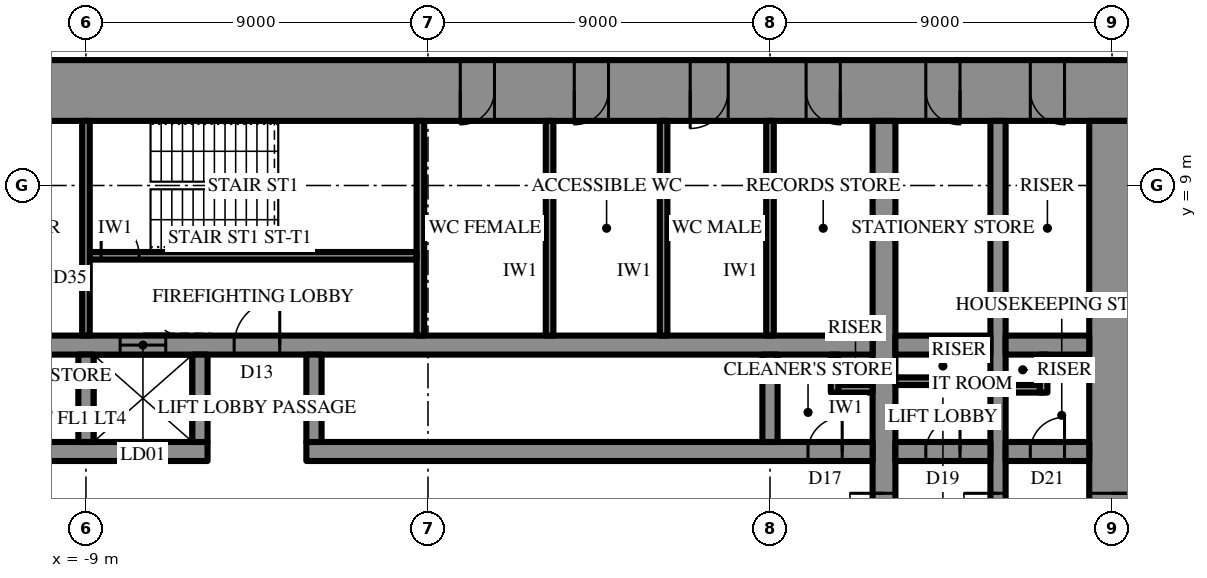
"""IFC4 building model, lengths in metres.
Left out: names, types, materials, properties, quantities, classifications, styles, units other than length and angle.
Written with IfcOpenShell. Run it as: python <this file> out.ifc"""

import sys

from ifc_helpers import new_model, si_unit, direction, frame, frame_2d, origin, place, context, subcontext, project, spatial, rectangle, extrude, element, fill, save


model = new_model("IFC4")
c1 = context("Model", 3, precision=1e-05, world=origin(), true_north=direction((0.0, 1.0)))
c2 = subcontext(c1, "Body", "Model", "MODEL_VIEW")
j1 = project(units=[si_unit("LENGTHUNIT", "METRE"), si_unit("PLANEANGLEUNIT", "RADIAN")], contexts=[c1])
p1 = place(None, origin())
s1 = spatial("IfcSite", under=j1, at=p1, CompositionType="ELEMENT")
p2 = place(p1, origin())
s2 = spatial("IfcBuilding", under=s1, at=p2, CompositionType="ELEMENT")
p3 = place(p2, frame((0.0, 0.0, -9.0)))
s3 = spatial("IfcBuildingStorey", under=s2, at=p3, CompositionType="ELEMENT", Elevation=-9.0)
p4 = place(p3, frame((-18.6, 11.5, 0.0), z_axis=(0.0, 0.0, 1.0), x_axis=(1.0, 0.0, 0.0)))
e1 = element("IfcWall", 1, at=p4, inside=s3, PredefinedType="SHEAR", context=c2, shape_type="SweptSolid", body=[
    extrude(rectangle(XDim=37.2, YDim=1.6, at=frame_2d((18.6, 0.0))), origin(), (0.0, 0.0, 1.0), 4.5),
])
p5 = place(p4, frame((19.45, 0.0, 0.0)))
e2 = element("IfcOpeningElement", 2, at=p5, cuts=e1, PredefinedType="OPENING", context=c2, shape_type="SweptSolid", body=[
    extrude(rectangle(XDim=0.9, YDim=2.2, at=frame_2d((0.45, 1.1))), frame((0.0, 0.81, 0.0), z_axis=(0.0, -1.0, 0.0), x_axis=(1.0, 0.0, 0.0)), (0.0, 0.0, 1.0), 1.62),
])
p6 = place(p4, frame((22.45, 0.0, 0.0)))
e3 = element("IfcOpeningElement", 3, at=p6, cuts=e1, PredefinedType="OPENING", context=c2, shape_type="SweptSolid", body=[
    extrude(rectangle(XDim=0.9, YDim=2.2, at=frame_2d((0.45, 1.1))), frame((0.0, 0.81, 0.0), z_axis=(0.0, -1.0, 0.0), x_axis=(1.0, 0.0, 0.0)), (0.0, 0.0, 1.0), 1.62),
])
p7 = place(p4, frame((25.5, 0.0, 0.0)))
e4 = element("IfcOpeningElement", 4, at=p7, cuts=e1, PredefinedType="OPENING", context=c2, shape_type="SweptSolid", body=[
    extrude(rectangle(XDim=1.0, YDim=2.2, at=frame_2d((0.5, 1.1))), frame((0.0, 0.81, 0.0), z_axis=(0.0, -1.0, 0.0), x_axis=(1.0, 0.0, 0.0)), (0.0, 0.0, 1.0), 1.62),
])
p8 = place(p4, frame((1.85, 0.0, 0.0)))
e5 = element("IfcOpeningElement", 5, at=p8, cuts=e1, PredefinedType="OPENING", context=c2, shape_type="SweptSolid", body=[
    extrude(rectangle(XDim=0.9, YDim=2.2, at=frame_2d((0.45, 1.1))), frame((0.0, 0.81, 0.0), z_axis=(0.0, -1.0, 0.0), x_axis=(1.0, 0.0, 0.0)), (0.0, 0.0, 1.0), 1.62),
])
p9 = place(p4, frame((4.6, 0.0, 0.0)))
e6 = element("IfcOpeningElement", 6, at=p9, cuts=e1, PredefinedType="OPENING", context=c2, shape_type="SweptSolid", body=[
    extrude(rectangle(XDim=0.9, YDim=2.2, at=frame_2d((0.45, 1.1))), frame((0.0, 0.81, 0.0), z_axis=(0.0, -1.0, 0.0), x_axis=(1.0, 0.0, 0.0)), (0.0, 0.0, 1.0), 1.62),
])
p10 = place(p4, frame((7.75, 0.0, 0.0)))
e7 = element("IfcOpeningElement", 7, at=p10, cuts=e1, PredefinedType="OPENING", context=c2, shape_type="SweptSolid", body=[
    extrude(rectangle(XDim=0.9, YDim=2.2, at=frame_2d((0.45, 1.1))), frame((0.0, 0.81, 0.0), z_axis=(0.0, -1.0, 0.0), x_axis=(1.0, 0.0, 0.0)), (0.0, 0.0, 1.0), 1.62),
])
p11 = place(p4, frame((28.55, 0.0, 0.0)))
e8 = element("IfcOpeningElement", 8, at=p11, cuts=e1, PredefinedType="OPENING", context=c2, shape_type="SweptSolid", body=[
    extrude(rectangle(XDim=0.9, YDim=2.2, at=frame_2d((0.45, 1.1))), frame((0.0, 0.81, 0.0), z_axis=(0.0, -1.0, 0.0), x_axis=(1.0, 0.0, 0.0)), (0.0, 0.0, 1.0), 1.62),
])
p12 = place(p4, frame((31.7, 0.0, 0.0)))
e9 = element("IfcOpeningElement", 9, at=p12, cuts=e1, PredefinedType="OPENING", context=c2, shape_type="SweptSolid", body=[
    extrude(rectangle(XDim=0.9, YDim=2.2, at=frame_2d((0.45, 1.1))), frame((0.0, 0.81, 0.0), z_axis=(0.0, -1.0, 0.0), x_axis=(1.0, 0.0, 0.0)), (0.0, 0.0, 1.0), 1.62),
])
p13 = place(p4, frame((34.45, 0.0, 0.0)))
e10 = element("IfcOpeningElement", 10, at=p13, cuts=e1, PredefinedType="OPENING", context=c2, shape_type="SweptSolid", body=[
    extrude(rectangle(XDim=0.9, YDim=2.2, at=frame_2d((0.45, 1.1))), frame((0.0, 0.81, 0.0), z_axis=(0.0, -1.0, 0.0), x_axis=(1.0, 0.0, 0.0)), (0.0, 0.0, 1.0), 1.62),
])
p14 = place(p3, frame((18.0, -10.7, 0.0), z_axis=(0.0, 0.0, 1.0), x_axis=(0.0, 1.0, 0.0)))
e11 = element("IfcWall", 11, at=p14, inside=s3, PredefinedType="SHEAR", context=c2, shape_type="SweptSolid", body=[
    extrude(rectangle(XDim=21.4, YDim=1.2, at=frame_2d((10.7, 0.0))), origin(), (0.0, 0.0, 1.0), 4.5),
])
p15 = place(p14, frame((9.8, 0.0, 0.0)))
e12 = element("IfcOpeningElement", 12, at=p15, cuts=e11, PredefinedType="OPENING", context=c2, shape_type="SweptSolid", body=[
    extrude(rectangle(XDim=1.8, YDim=2.4, at=frame_2d((0.9, 1.2))), frame((0.0, 0.61, 0.0), z_axis=(0.0, -1.0, 0.0), x_axis=(1.0, 0.0, 0.0)), (0.0, 0.0, 1.0), 1.22),
])
p16 = place(p3, frame((12.0, -10.7, 0.0), z_axis=(0.0, 0.0, 1.0), x_axis=(0.0, 1.0, 0.0)))
e13 = element("IfcWall", 13, at=p16, inside=s3, PredefinedType="SHEAR", context=c2, shape_type="SweptSolid", body=[
    extrude(rectangle(XDim=21.4, YDim=0.6, at=frame_2d((10.7, 0.0))), origin(), (0.0, 0.0, 1.0), 4.5),
])
p17 = place(p16, frame((9.8, 0.0, 0.0)))
e14 = element("IfcOpeningElement", 14, at=p17, cuts=e13, PredefinedType="OPENING", context=c2, shape_type="SweptSolid", body=[
    extrude(rectangle(XDim=1.8, YDim=2.4, at=frame_2d((0.9, 1.2))), frame((0.0, 0.31, 0.0), z_axis=(0.0, -1.0, 0.0), x_axis=(1.0, 0.0, 0.0)), (0.0, 0.0, 1.0), 0.62),
])
p18 = place(p3, frame((15.0, -10.7, 0.0), z_axis=(0.0, 0.0, 1.0), x_axis=(0.0, 1.0, 0.0)))
e15 = element("IfcWall", 15, at=p18, inside=s3, PredefinedType="SHEAR", context=c2, shape_type="SweptSolid", body=[
    extrude(rectangle(XDim=21.4, YDim=0.4, at=frame_2d((10.7, 0.0))), origin(), (0.0, 0.0, 1.0), 4.5),
])
p19 = place(p18, frame((9.8, 0.0, 0.0)))
e16 = element("IfcOpeningElement", 16, at=p19, cuts=e15, PredefinedType="OPENING", context=c2, shape_type="SweptSolid", body=[
    extrude(rectangle(XDim=1.8, YDim=2.4, at=frame_2d((0.9, 1.2))), frame((0.0, 0.21, 0.0), z_axis=(0.0, -1.0, 0.0), x_axis=(1.0, 0.0, 0.0)), (0.0, 0.0, 1.0), 0.42),
])
p20 = place(p3, frame((-11.7, 2.0, 0.0), z_axis=(0.0, 0.0, 1.0), x_axis=(1.0, 0.0, 0.0)))
e17 = element("IfcWall", 17, at=p20, inside=s3, PredefinedType="SHEAR", context=c2, shape_type="SweptSolid", body=[
    extrude(rectangle(XDim=5.9, YDim=0.5, at=frame_2d((2.95, 0.0))), origin(), (0.0, 0.0, 1.0), 4.5),
])
p21 = place(p20, frame((0.8, 0.0, 0.0)))
e18 = element("IfcOpeningElement", 18, at=p21, cuts=e17, PredefinedType="OPENING", context=c2, shape_type="SweptSolid", body=[
    extrude(rectangle(XDim=0.9, YDim=2.2, at=frame_2d((0.45, 1.1))), frame((0.0, 0.26, 0.0), z_axis=(0.0, -1.0, 0.0), x_axis=(1.0, 0.0, 0.0)), (0.0, 0.0, 1.0), 0.52),
])
p22 = place(p3, frame((-3.2, 2.0, 0.0), z_axis=(0.0, 0.0, 1.0), x_axis=(1.0, 0.0, 0.0)))
e19 = element("IfcWall", 19, at=p22, inside=s3, PredefinedType="SHEAR", context=c2, shape_type="SweptSolid", body=[
    extrude(rectangle(XDim=14.9, YDim=0.5, at=frame_2d((7.45, 0.0))), origin(), (0.0, 0.0, 1.0), 4.5),
])
p23 = place(p22, frame((13.2, 0.0, 0.0)))
e20 = element("IfcOpeningElement", 20, at=p23, cuts=e19, PredefinedType="OPENING", context=c2, shape_type="SweptSolid", body=[
    extrude(rectangle(XDim=0.9, YDim=2.2, at=frame_2d((0.45, 1.1))), frame((0.0, 0.26, 0.0), z_axis=(0.0, -1.0, 0.0), x_axis=(1.0, 0.0, 0.0)), (0.0, 0.0, 1.0), 0.52),
])
p24 = place(p3, frame((12.3, 2.0, 0.0), z_axis=(0.0, 0.0, 1.0), x_axis=(1.0, 0.0, 0.0)))
e21 = element("IfcWall", 21, at=p24, inside=s3, PredefinedType="SHEAR", context=c2, shape_type="SweptSolid", body=[
    extrude(rectangle(XDim=2.5, YDim=0.5, at=frame_2d((1.25, 0.0))), origin(), (0.0, 0.0, 1.0), 4.5),
])
p25 = place(p24, frame((0.8, 0.0, 0.0)))
e22 = element("IfcOpeningElement", 22, at=p25, cuts=e21, PredefinedType="OPENING", context=c2, shape_type="SweptSolid", body=[
    extrude(rectangle(XDim=0.9, YDim=2.2, at=frame_2d((0.45, 1.1))), frame((0.0, 0.26, 0.0), z_axis=(0.0, -1.0, 0.0), x_axis=(1.0, 0.0, 0.0)), (0.0, 0.0, 1.0), 0.52),
])
p26 = place(p3, frame((15.2, 2.0, 0.0), z_axis=(0.0, 0.0, 1.0), x_axis=(1.0, 0.0, 0.0)))
e23 = element("IfcWall", 23, at=p26, inside=s3, PredefinedType="SHEAR", context=c2, shape_type="SweptSolid", body=[
    extrude(rectangle(XDim=2.2, YDim=0.5, at=frame_2d((1.1, 0.0))), origin(), (0.0, 0.0, 1.0), 4.5),
])
p27 = place(p26, frame((0.65, 0.0, 0.0)))
e24 = element("IfcOpeningElement", 24, at=p27, cuts=e23, PredefinedType="OPENING", context=c2, shape_type="SweptSolid", body=[
    extrude(rectangle(XDim=0.9, YDim=2.2, at=frame_2d((0.45, 1.1))), frame((0.0, 0.26, 0.0), z_axis=(0.0, -1.0, 0.0), x_axis=(1.0, 0.0, 0.0)), (0.0, 0.0, 1.0), 0.52),
])
p28 = place(p3, frame((-11.7, 4.8, 0.0), z_axis=(0.0, 0.0, 1.0), x_axis=(1.0, 0.0, 0.0)))
e25 = element("IfcWall", 25, at=p28, inside=s3, PredefinedType="SHEAR", context=c2, shape_type="SweptSolid", body=[
    extrude(rectangle(XDim=23.4, YDim=0.5, at=frame_2d((11.7, 0.0))), origin(), (0.0, 0.0, 1.0), 4.5),
])
p29 = place(p28, frame((6.6, 0.0, 0.0)))
e26 = element("IfcOpeningElement", 26, at=p29, cuts=e25, PredefinedType="OPENING", context=c2, shape_type="SweptSolid", body=[
    extrude(rectangle(XDim=1.2, YDim=2.2, at=frame_2d((0.6, 1.1))), frame((0.0, 0.26, 0.0), z_axis=(0.0, -1.0, 0.0), x_axis=(1.0, 0.0, 0.0)), (0.0, 0.0, 1.0), 0.52),
])
p30 = place(p28, frame((3.6, 0.0, 0.0)))
e27 = element("IfcOpeningElement", 27, at=p30, cuts=e25, PredefinedType="OPENING", context=c2, shape_type="SweptSolid", body=[
    extrude(rectangle(XDim=1.2, YDim=2.2, at=frame_2d((0.6, 1.1))), frame((0.0, 0.26, 0.0), z_axis=(0.0, -1.0, 0.0), x_axis=(1.0, 0.0, 0.0)), (0.0, 0.0, 1.0), 0.52),
])
p31 = place(p3, frame((12.3, 4.8, 0.0), z_axis=(0.0, 0.0, 1.0), x_axis=(1.0, 0.0, 0.0)))
e28 = element("IfcWall", 28, at=p31, inside=s3, PredefinedType="SHEAR", context=c2, shape_type="SweptSolid", body=[
    extrude(rectangle(XDim=2.5, YDim=0.5, at=frame_2d((1.25, 0.0))), origin(), (0.0, 0.0, 1.0), 4.5),
])
p32 = place(p3, frame((15.2, 4.8, 0.0), z_axis=(0.0, 0.0, 1.0), x_axis=(1.0, 0.0, 0.0)))
e29 = element("IfcWall", 29, at=p32, inside=s3, PredefinedType="SHEAR", context=c2, shape_type="SweptSolid", body=[
    extrude(rectangle(XDim=2.2, YDim=0.5, at=frame_2d((1.1, 0.0))), origin(), (0.0, 0.0, 1.0), 4.5),
])
for number, where, z_axis, x_axis in (
    (30, (-9.0, 2.25, 0.0), (0.0, 0.0, 1.0), (0.0, 1.0, 0.0)),
    (31, (-6.0, 2.25, 0.0), (0.0, 0.0, 1.0), (0.0, 1.0, 0.0)),
    (32, (-3.0, 2.25, 0.0), (0.0, 0.0, 1.0), (0.0, 1.0, 0.0)),
    (33, (9.0, 2.25, 0.0), (0.0, 0.0, 1.0), (0.0, 1.0, 0.0)),
):
    element("IfcWall", number, at=place(p3, frame(where, z_axis=z_axis, x_axis=x_axis)), inside=s3, PredefinedType="SHEAR", context=c2, shape_type="SweptSolid", body=[
        extrude(rectangle(XDim=2.3, YDim=0.4, at=frame_2d((1.15, 0.0))), origin(), (0.0, 0.0, 1.0), 4.5),
    ])
p33 = place(p3, frame((-0.2, 5.05, 0.0), z_axis=(0.0, 0.0, 1.0), x_axis=(0.0, 1.0, 0.0)))
e34 = element("IfcWall", 34, at=p33, inside=s3, PredefinedType="SHEAR", context=c2, shape_type="SweptSolid", body=[
    extrude(rectangle(XDim=5.65, YDim=0.2, at=frame_2d((2.825, 0.0))), origin(), (0.0, 0.0, 1.0), 4.5),
])
p34 = place(p3, frame((-8.9, 7.15, 0.0), z_axis=(0.0, 0.0, 1.0), x_axis=(1.0, 0.0, 0.0)))
e35 = element("IfcWall", 35, at=p34, inside=s3, PredefinedType="SHEAR", context=c2, shape_type="SweptSolid", body=[
    extrude(rectangle(XDim=8.6, YDim=0.2, at=frame_2d((4.3, 0.0))), origin(), (0.0, 0.0, 1.0), 4.5),
])
p35 = place(p34, frame((0.3, 0.0, 0.0)))
e36 = element("IfcOpeningElement", 36, at=p35, cuts=e35, PredefinedType="OPENING", context=c2, shape_type="SweptSolid", body=[
    extrude(rectangle(XDim=1.0, YDim=2.2, at=frame_2d((0.5, 1.1))), frame((0.0, 0.11, 0.0), z_axis=(0.0, -1.0, 0.0), x_axis=(1.0, 0.0, 0.0)), (0.0, 0.0, 1.0), 0.22),
])
for number, where, z_axis, x_axis in (
    (37, (-9.0, 5.05, 0.0), (0.0, 0.0, 1.0), (0.0, 1.0, 0.0)),
    (38, (9.0, 5.05, 0.0), (0.0, 0.0, 1.0), (0.0, 1.0, 0.0)),
    (39, (3.2, 5.05, 0.0), (0.0, 0.0, 1.0), (0.0, 1.0, 0.0)),
    (40, (6.2, 5.05, 0.0), (0.0, 0.0, 1.0), (0.0, 1.0, 0.0)),
):
    element("IfcWall", number, at=place(p3, frame(where, z_axis=z_axis, x_axis=x_axis)), inside=s3, PredefinedType="PARTITIONING", context=c2, shape_type="SweptSolid", body=[
        extrude(rectangle(XDim=5.65, YDim=0.2, at=frame_2d((2.825, 0.0))), origin(), (0.0, 0.0, 1.0), 4.15),
    ])
for number, where, z_axis, x_axis in (
    (41, (10.7, 3.65, 0.0), (0.0, 0.0, 1.0), (1.0, 0.0, 0.0)),
    (42, (10.7, 3.55, 0.0), (0.0, 0.0, 1.0), (0.0, 1.0, 0.0)),
):
    element("IfcWall", number, at=place(p3, frame(where, z_axis=z_axis, x_axis=x_axis)), inside=s3, PredefinedType="PARTITIONING", context=c2, shape_type="SweptSolid", body=[
        extrude(rectangle(XDim=1.0, YDim=0.2, at=frame_2d((0.5, 0.0))), origin(), (0.0, 0.0, 1.0), 4.15),
    ])
p36 = place(p3, frame((12.3, 3.85, 0.0), z_axis=(0.0, 0.0, 1.0), x_axis=(1.0, 0.0, 0.0)))
e43 = element("IfcWall", 43, at=p36, inside=s3, PredefinedType="PARTITIONING", context=c2, shape_type="SweptSolid", body=[
    extrude(rectangle(XDim=2.5, YDim=0.2, at=frame_2d((1.25, 0.0))), origin(), (0.0, 0.0, 1.0), 4.15),
])
for number, where, z_axis, x_axis in (
    (44, (15.2, 3.65, 0.0), (0.0, 0.0, 1.0), (1.0, 0.0, 0.0)),
    (45, (16.2, 3.55, 0.0), (0.0, 0.0, 1.0), (0.0, 1.0, 0.0)),
):
    element("IfcWall", number, at=place(p3, frame(where, z_axis=z_axis, x_axis=x_axis)), inside=s3, PredefinedType="PARTITIONING", context=c2, shape_type="SweptSolid", body=[
        extrude(rectangle(XDim=1.0, YDim=0.2, at=frame_2d((0.5, 0.0))), origin(), (0.0, 0.0, 1.0), 4.15),
    ])
p37 = place(p15, frame((1.8, 0.0, 0.0), z_axis=(0.0, 0.0, 1.0), x_axis=(-1.0, 0.0, 0.0)))
e46 = element("IfcDoor", 46, at=p37, inside=s3, OperationType="DOUBLE_DOOR_SINGLE_SWING", PredefinedType="DOOR", context=c2, shape_type="SweptSolid", body=[
    extrude(rectangle(XDim=1.8, YDim=2.4, at=frame_2d((0.9, 1.2))), frame((0.0, 0.025, 0.0), z_axis=(0.0, -1.0, 0.0), x_axis=(1.0, 0.0, 0.0)), (0.0, 0.0, 1.0), 0.05),
])
fill(e12, e46)
p38 = place(p29, origin())
e47 = element("IfcDoor", 47, at=p38, inside=s3, OperationType="SINGLE_SWING_LEFT", PredefinedType="DOOR", context=c2, shape_type="SweptSolid", body=[
    extrude(rectangle(XDim=1.2, YDim=2.2, at=frame_2d((0.6, 1.1))), frame((0.0, 0.025, 0.0), z_axis=(0.0, -1.0, 0.0), x_axis=(1.0, 0.0, 0.0)), (0.0, 0.0, 1.0), 0.05),
])
fill(e26, e47)
p39 = place(p35, origin())
e48 = element("IfcDoor", 48, at=p39, inside=s3, OperationType="SINGLE_SWING_RIGHT", PredefinedType="DOOR", context=c2, shape_type="SweptSolid", body=[
    extrude(rectangle(XDim=1.0, YDim=2.2, at=frame_2d((0.5, 1.1))), frame((0.0, 0.025, 0.0), z_axis=(0.0, -1.0, 0.0), x_axis=(1.0, 0.0, 0.0)), (0.0, 0.0, 1.0), 0.05),
])
fill(e36, e48)
p40 = place(p5, frame((0.9, 0.0, 0.0), z_axis=(0.0, 0.0, 1.0), x_axis=(-1.0, 0.0, 0.0)))
e49 = element("IfcDoor", 49, at=p40, inside=s3, OperationType="SINGLE_SWING_LEFT", PredefinedType="DOOR", context=c2, shape_type="SweptSolid", body=[
    extrude(rectangle(XDim=0.9, YDim=2.2, at=frame_2d((0.45, 1.1))), frame((0.0, 0.025, 0.0), z_axis=(0.0, -1.0, 0.0), x_axis=(1.0, 0.0, 0.0)), (0.0, 0.0, 1.0), 0.05),
])
fill(e2, e49)
p41 = place(p6, frame((0.9, 0.0, 0.0), z_axis=(0.0, 0.0, 1.0), x_axis=(-1.0, 0.0, 0.0)))
e50 = element("IfcDoor", 50, at=p41, inside=s3, OperationType="SINGLE_SWING_LEFT", PredefinedType="DOOR", context=c2, shape_type="SweptSolid", body=[
    extrude(rectangle(XDim=0.9, YDim=2.2, at=frame_2d((0.45, 1.1))), frame((0.0, 0.025, 0.0), z_axis=(0.0, -1.0, 0.0), x_axis=(1.0, 0.0, 0.0)), (0.0, 0.0, 1.0), 0.05),
])
fill(e3, e50)
p42 = place(p7, frame((1.0, 0.0, 0.0), z_axis=(0.0, 0.0, 1.0), x_axis=(-1.0, 0.0, 0.0)))
e51 = element("IfcDoor", 51, at=p42, inside=s3, OperationType="SINGLE_SWING_LEFT", PredefinedType="DOOR", context=c2, shape_type="SweptSolid", body=[
    extrude(rectangle(XDim=1.0, YDim=2.2, at=frame_2d((0.5, 1.1))), frame((0.0, 0.025, 0.0), z_axis=(0.0, -1.0, 0.0), x_axis=(1.0, 0.0, 0.0)), (0.0, 0.0, 1.0), 0.05),
])
fill(e4, e51)
p43 = place(p11, frame((0.9, 0.0, 0.0), z_axis=(0.0, 0.0, 1.0), x_axis=(-1.0, 0.0, 0.0)))
e52 = element("IfcDoor", 52, at=p43, inside=s3, OperationType="SINGLE_SWING_RIGHT", PredefinedType="DOOR", context=c2, shape_type="SweptSolid", body=[
    extrude(rectangle(XDim=0.9, YDim=2.2, at=frame_2d((0.45, 1.1))), frame((0.0, 0.025, 0.0), z_axis=(0.0, -1.0, 0.0), x_axis=(1.0, 0.0, 0.0)), (0.0, 0.0, 1.0), 0.05),
])
fill(e8, e52)
p44 = place(p12, frame((0.9, 0.0, 0.0), z_axis=(0.0, 0.0, 1.0), x_axis=(-1.0, 0.0, 0.0)))
e53 = element("IfcDoor", 53, at=p44, inside=s3, OperationType="SINGLE_SWING_RIGHT", PredefinedType="DOOR", context=c2, shape_type="SweptSolid", body=[
    extrude(rectangle(XDim=0.9, YDim=2.2, at=frame_2d((0.45, 1.1))), frame((0.0, 0.025, 0.0), z_axis=(0.0, -1.0, 0.0), x_axis=(1.0, 0.0, 0.0)), (0.0, 0.0, 1.0), 0.05),
])
fill(e9, e53)
p45 = place(p13, frame((0.9, 0.0, 0.0), z_axis=(0.0, 0.0, 1.0), x_axis=(-1.0, 0.0, 0.0)))
e54 = element("IfcDoor", 54, at=p45, inside=s3, OperationType="SINGLE_SWING_RIGHT", PredefinedType="DOOR", context=c2, shape_type="SweptSolid", body=[
    extrude(rectangle(XDim=0.9, YDim=2.2, at=frame_2d((0.45, 1.1))), frame((0.0, 0.025, 0.0), z_axis=(0.0, -1.0, 0.0), x_axis=(1.0, 0.0, 0.0)), (0.0, 0.0, 1.0), 0.05),
])
fill(e10, e54)
p46 = place(p23, origin())
e55 = element("IfcDoor", 55, at=p46, inside=s3, OperationType="SINGLE_SWING_LEFT", PredefinedType="DOOR", context=c2, shape_type="SweptSolid", body=[
    extrude(rectangle(XDim=0.9, YDim=2.2, at=frame_2d((0.45, 1.1))), frame((0.0, 0.025, 0.0), z_axis=(0.0, -1.0, 0.0), x_axis=(1.0, 0.0, 0.0)), (0.0, 0.0, 1.0), 0.05),
])
fill(e20, e55)
p47 = place(p25, origin())
e56 = element("IfcDoor", 56, at=p47, inside=s3, OperationType="SINGLE_SWING_LEFT", PredefinedType="DOOR", context=c2, shape_type="SweptSolid", body=[
    extrude(rectangle(XDim=0.9, YDim=2.2, at=frame_2d((0.45, 1.1))), frame((0.0, 0.025, 0.0), z_axis=(0.0, -1.0, 0.0), x_axis=(1.0, 0.0, 0.0)), (0.0, 0.0, 1.0), 0.05),
])
fill(e22, e56)
p48 = place(p27, origin())
e57 = element("IfcDoor", 57, at=p48, inside=s3, OperationType="SINGLE_SWING_LEFT", PredefinedType="DOOR", context=c2, shape_type="SweptSolid", body=[
    extrude(rectangle(XDim=0.9, YDim=2.2, at=frame_2d((0.45, 1.1))), frame((0.0, 0.025, 0.0), z_axis=(0.0, -1.0, 0.0), x_axis=(1.0, 0.0, 0.0)), (0.0, 0.0, 1.0), 0.05),
])
fill(e24, e57)
p49 = place(p17, origin())
e58 = element("IfcDoor", 58, at=p49, inside=s3, OperationType="DOUBLE_DOOR_SINGLE_SWING", PredefinedType="DOOR", context=c2, shape_type="SweptSolid", body=[
    extrude(rectangle(XDim=1.8, YDim=2.4, at=frame_2d((0.9, 1.2))), frame((0.0, 0.025, 0.0), z_axis=(0.0, -1.0, 0.0), x_axis=(1.0, 0.0, 0.0)), (0.0, 0.0, 1.0), 0.05),
])
fill(e14, e58)
p50 = place(p19, origin())
e59 = element("IfcDoor", 59, at=p50, inside=s3, OperationType="DOUBLE_DOOR_SINGLE_SWING", PredefinedType="DOOR", context=c2, shape_type="SweptSolid", body=[
    extrude(rectangle(XDim=1.8, YDim=2.4, at=frame_2d((0.9, 1.2))), frame((0.0, 0.025, 0.0), z_axis=(0.0, -1.0, 0.0), x_axis=(1.0, 0.0, 0.0)), (0.0, 0.0, 1.0), 0.05),
])
fill(e16, e59)
p51 = place(p30, origin())
e60 = element("IfcDoor", 60, at=p51, inside=s3, OperationType="SLIDING_TO_LEFT", PredefinedType="DOOR", context=c2, shape_type="SweptSolid", body=[
    extrude(rectangle(XDim=1.2, YDim=2.2, at=frame_2d((0.6, 1.1))), frame((0.0, 0.025, 0.0), z_axis=(0.0, -1.0, 0.0), x_axis=(1.0, 0.0, 0.0)), (0.0, 0.0, 1.0), 0.05),
])
fill(e27, e60)
save(model, sys.argv[1])
